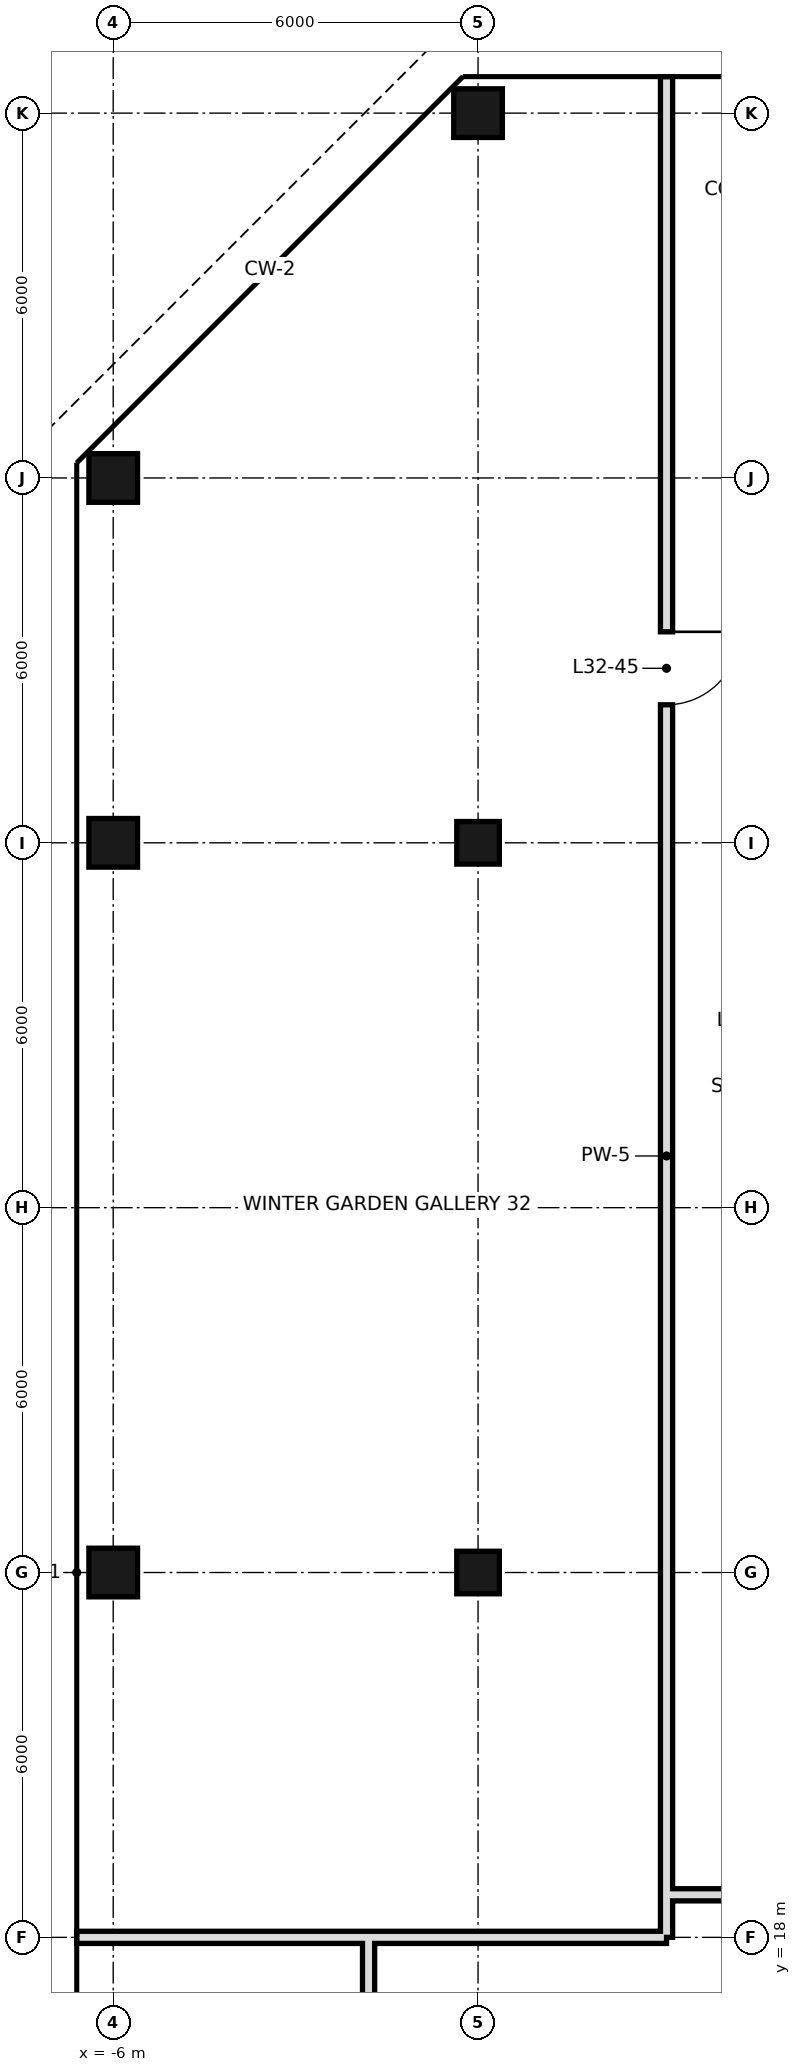
"""IFC4 building model, lengths in metres.
Left out: names, types, materials, properties, quantities, classifications, styles, units other than length and angle.
Written with IfcOpenShell. Run it as: python <this file> out.ifc"""

import sys

from ifc_helpers import new_model, si_unit, direction, frame, frame_2d, origin, origin_2d, place, context, subcontext, project, spatial, rectangle, hollow_rectangle, extrude, element, fill, save


model = new_model("IFC4")
c1 = context("Model", 3, precision=1e-05, world=origin(), true_north=direction((0.0, 1.0)))
c2 = subcontext(c1, "Body", "Model", "MODEL_VIEW")
j1 = project(units=[si_unit("LENGTHUNIT", "METRE"), si_unit("PLANEANGLEUNIT", "RADIAN")], contexts=[c1])
p1 = place(None, origin())
s1 = spatial("IfcSite", under=j1, at=p1, CompositionType="ELEMENT")
p2 = place(p1, origin())
s2 = spatial("IfcBuilding", under=s1, at=p2, CompositionType="ELEMENT")
p3 = place(p2, frame((0.0, 0.0, 143.8)))
s3 = spatial("IfcBuildingStorey", under=s2, at=p3, CompositionType="ELEMENT", Elevation=143.8)
for number, where, z_axis, x_axis in (
    (1, (-6.0, 24.0, 0.0), (0.0, 0.0, 1.0), (1.0, 0.0, 0.0)),
    (2, (-6.0, 36.0, 0.0), (0.0, 0.0, 1.0), (1.0, 0.0, 0.0)),
    (3, (-6.0, 42.0, 0.0), (0.0, 0.0, 1.0), (1.0, 0.0, 0.0)),
):
    element("IfcColumn", number, at=place(p3, frame(where, z_axis=z_axis, x_axis=x_axis)), inside=s3, PredefinedType="COLUMN", context=c2, shape_type="SweptSolid", body=[
        extrude(hollow_rectangle(XDim=0.8, YDim=0.8, WallThickness=0.04, at=origin_2d()), origin(), (0.0, 0.0, 1.0), 3.6),
    ])
for number, where, z_axis, x_axis in (
    (4, (0.0, 24.0, 0.0), (0.0, 0.0, 1.0), (1.0, 0.0, 0.0)),
    (5, (0.0, 36.0, 0.0), (0.0, 0.0, 1.0), (1.0, 0.0, 0.0)),
):
    element("IfcColumn", number, at=place(p3, frame(where, z_axis=z_axis, x_axis=x_axis)), inside=s3, PredefinedType="COLUMN", context=c2, shape_type="SweptSolid", body=[
        extrude(hollow_rectangle(XDim=0.7, YDim=0.7, WallThickness=0.036, at=origin_2d()), origin(), (0.0, 0.0, 1.0), 3.6),
    ])
p4 = place(p3, frame((0.0, 48.0, 0.0), z_axis=(0.0, 0.0, 1.0), x_axis=(1.0, 0.0, 0.0)))
e6 = element("IfcColumn", 6, at=p4, inside=s3, PredefinedType="COLUMN", context=c2, shape_type="SweptSolid", body=[
    extrude(hollow_rectangle(XDim=0.8, YDim=0.8, WallThickness=0.04, at=origin_2d()), origin(), (0.0, 0.0, 1.0), 3.6),
])
p5 = place(p3, frame((-1.8, 10.8, 0.0), z_axis=(0.0, 0.0, 1.0), x_axis=(0.0, 1.0, 0.0)))
e7 = element("IfcWall", 7, at=p5, inside=s3, PredefinedType="SOLIDWALL", context=c2, shape_type="SweptSolid", body=[
    extrude(rectangle(XDim=7.2, YDim=0.2, at=frame_2d((3.6, 0.0))), origin(), (0.0, 0.0, 1.0), 3.42),
])
p6 = place(p3, frame((3.1, 18.0, 0.0), z_axis=(0.0, 0.0, 1.0), x_axis=(0.0, 1.0, 0.0)))
e8 = element("IfcWall", 8, at=p6, inside=s3, PredefinedType="SOLIDWALL", context=c2, shape_type="SweptSolid", body=[
    extrude(rectangle(XDim=30.6, YDim=0.2, at=frame_2d((15.3, 0.0))), origin(), (0.0, 0.0, 1.0), 2.72),
])
p7 = place(p6, frame((20.27, 0.0, 0.0)))
e9 = element("IfcOpeningElement", 9, at=p7, cuts=e8, PredefinedType="OPENING", context=c2, shape_type="SweptSolid", body=[
    extrude(rectangle(XDim=1.2, YDim=2.4, at=frame_2d((0.6, 1.2))), frame((0.0, 0.11, 0.0), z_axis=(0.0, -1.0, 0.0), x_axis=(1.0, 0.0, 0.0)), (0.0, 0.0, 1.0), 0.22),
])
p8 = place(p3, frame((-1.8, 18.0, 0.0), z_axis=(0.0, 0.0, 1.0), x_axis=(1.0, 0.0, 0.0)))
e10 = element("IfcWall", 10, at=p8, inside=s3, PredefinedType="SOLIDWALL", context=c2, shape_type="SweptSolid", body=[
    extrude(rectangle(XDim=4.9, YDim=0.2, at=frame_2d((2.45, 0.0))), origin(), (0.0, 0.0, 1.0), 2.72),
])
p9 = place(p3, frame((-6.6, 18.0, 0.0), z_axis=(0.0, 0.0, 1.0), x_axis=(1.0, 0.0, 0.0)))
e11 = element("IfcWall", 11, at=p9, inside=s3, PredefinedType="SOLIDWALL", context=c2, shape_type="SweptSolid", body=[
    extrude(rectangle(XDim=4.8, YDim=0.2, at=frame_2d((2.4, 0.0))), origin(), (0.0, 0.0, 1.0), 2.72),
])
p10 = place(p3, frame((3.1, 18.7, 0.0), z_axis=(0.0, 0.0, 1.0), x_axis=(1.0, 0.0, 0.0)))
e12 = element("IfcWall", 12, at=p10, inside=s3, PredefinedType="SOLIDWALL", context=c2, shape_type="SweptSolid", body=[
    extrude(rectangle(XDim=41.8, YDim=0.2, at=frame_2d((20.9, 0.0))), origin(), (0.0, 0.0, 1.0), 2.72),
])
p11 = place(p10, frame((5.64, 0.0, 0.0)))
e13 = element("IfcOpeningElement", 13, at=p11, cuts=e12, PredefinedType="OPENING", context=c2, shape_type="SweptSolid", body=[
    extrude(rectangle(XDim=1.2, YDim=2.4, at=frame_2d((0.6, 1.2))), frame((0.0, 0.11, 0.0), z_axis=(0.0, -1.0, 0.0), x_axis=(1.0, 0.0, 0.0)), (0.0, 0.0, 1.0), 0.22),
])
p12 = place(p10, frame((24.16, 0.0, 0.0)))
e14 = element("IfcOpeningElement", 14, at=p12, cuts=e12, PredefinedType="OPENING", context=c2, shape_type="SweptSolid", body=[
    extrude(rectangle(XDim=1.2, YDim=2.4, at=frame_2d((0.6, 1.2))), frame((0.0, 0.11, 0.0), z_axis=(0.0, -1.0, 0.0), x_axis=(1.0, 0.0, 0.0)), (0.0, 0.0, 1.0), 0.22),
])
p13 = place(p7, origin())
e15 = element("IfcDoor", 15, at=p13, inside=s3, OperationType="SINGLE_SWING_RIGHT", PredefinedType="DOOR", context=c2, shape_type="SweptSolid", body=[
    extrude(rectangle(XDim=1.2, YDim=2.4, at=frame_2d((0.6, 1.2))), frame((0.0, 0.025, 0.0), z_axis=(0.0, -1.0, 0.0), x_axis=(1.0, 0.0, 0.0)), (0.0, 0.0, 1.0), 0.05),
])
fill(e9, e15)
save(model, sys.argv[1])
